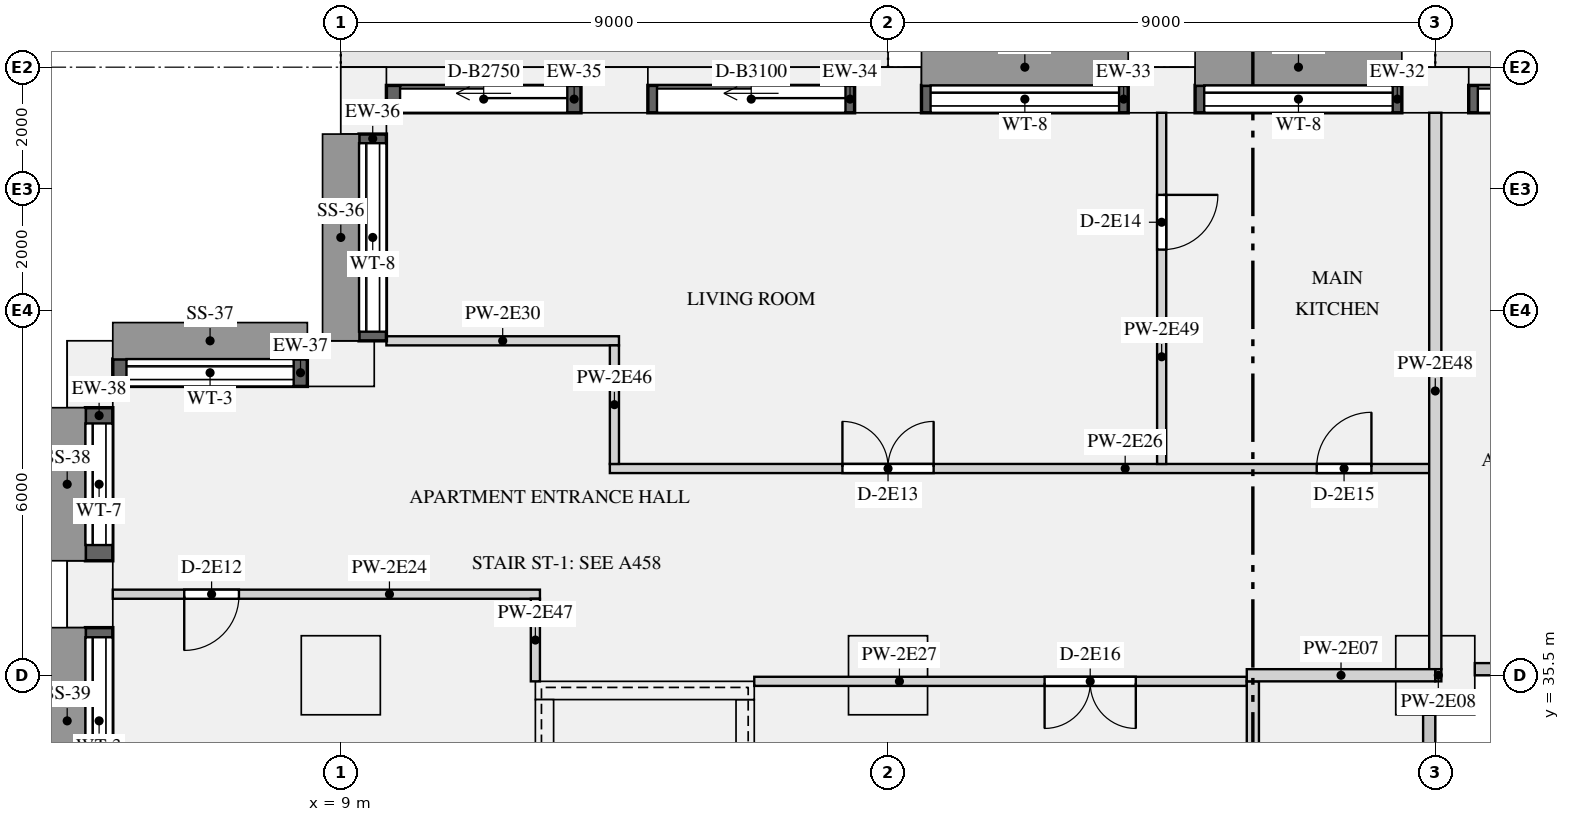
"""IFC4 building model, lengths in metres.
Left out: names, types, materials, properties, quantities, classifications, styles, units other than length and angle.
Written with IfcOpenShell. Run it as: python <this file> out.ifc"""

import sys

from ifc_helpers import new_model, si_unit, direction, frame, frame_2d, origin, origin_2d, place, context, subcontext, project, spatial, rectangle, extrude, element, fill, save


model = new_model("IFC4")
c1 = context("Model", 3, precision=1e-05, world=origin(), true_north=direction((0.0, 1.0)))
c2 = subcontext(c1, "Body", "Model", "MODEL_VIEW")
j1 = project(units=[si_unit("LENGTHUNIT", "METRE"), si_unit("PLANEANGLEUNIT", "RADIAN")], contexts=[c1])
p1 = place(None, origin())
s1 = spatial("IfcSite", under=j1, at=p1, CompositionType="ELEMENT")
p2 = place(p1, origin())
s2 = spatial("IfcBuilding", under=s1, at=p2, CompositionType="ELEMENT")
p3 = place(p2, frame((0.0, 0.0, 118.2)))
s3 = spatial("IfcBuildingStorey", under=s2, at=p3, CompositionType="ELEMENT", Elevation=118.2)
for number, where, z_axis, x_axis in (
    (1, (27.0, 45.125, 0.0), (0.0, 0.0, 1.0), (-1.0, 0.0, 0.0)),
    (2, (22.5, 45.125, 0.0), (0.0, 0.0, 1.0), (-1.0, 0.0, 0.0)),
    (3, (18.0, 45.125, 0.0), (0.0, 0.0, 1.0), (-1.0, 0.0, 0.0)),
    (4, (13.5, 45.125, 0.0), (0.0, 0.0, 1.0), (-1.0, 0.0, 0.0)),
    (5, (9.375, 44.95, 0.0), (0.0, 0.0, 1.0), (0.0, -1.0, 0.0)),
    (6, (9.0, 40.625, 0.0), (0.0, 0.0, 1.0), (-1.0, 0.0, 0.0)),
    (7, (4.875, 40.45, 0.0), (0.0, 0.0, 1.0), (0.0, -1.0, 0.0)),
    (8, (4.875, 36.833, 0.0), (0.0, 0.0, 1.0), (0.0, -1.0, 0.0)),
):
    element("IfcColumn", number, at=place(p3, frame(where, z_axis=z_axis, x_axis=x_axis)), inside=s3, PredefinedType="USERDEFINED", context=c2, shape_type="SweptSolid", body=[
        extrude(rectangle(XDim=1.1, YDim=0.75, at=origin_2d()), origin(), (0.0, 0.0, 1.0), 3.15),
    ])
for number, where, z_axis, x_axis in (
    (9, (9.0, 35.5, 0.0), (0.0, 0.0, 1.0), (1.0, 0.0, 0.0)),
    (10, (18.0, 35.5, 0.0), (0.0, 0.0, 1.0), (1.0, 0.0, 0.0)),
    (11, (27.0, 35.5, 0.0), (0.0, 0.0, 1.0), (1.0, 0.0, 0.0)),
):
    element("IfcColumn", number, at=place(p3, frame(where, z_axis=z_axis, x_axis=x_axis)), inside=s3, PredefinedType="COLUMN", context=c2, shape_type="SweptSolid", body=[
        extrude(rectangle(XDim=1.3, YDim=1.3, at=origin_2d()), origin(), (0.0, 0.0, 1.0), 3.15),
    ])
p4 = place(p3, frame((12.2, 35.25, 0.0), z_axis=(0.0, 0.0, 1.0), x_axis=(1.0, 0.0, 0.0)))
e12 = element("IfcWall", 12, at=p4, inside=s3, PredefinedType="SHEAR", context=c2, shape_type="SweptSolid", body=[
    extrude(rectangle(XDim=3.6, YDim=0.3, at=frame_2d((1.8, 0.0))), origin(), (0.0, 0.0, 1.0), 3.15),
])
for number, where, z_axis, x_axis in (
    (13, (12.35, 27.3, 0.0), (0.0, 0.0, 1.0), (0.0, 1.0, 0.0)),
    (14, (15.65, 27.3, 0.0), (0.0, 0.0, 1.0), (0.0, 1.0, 0.0)),
):
    element("IfcWall", number, at=place(p3, frame(where, z_axis=z_axis, x_axis=x_axis)), inside=s3, PredefinedType="SHEAR", context=c2, shape_type="SweptSolid", body=[
        extrude(rectangle(XDim=7.8, YDim=0.3, at=frame_2d((3.9, 0.0))), origin(), (0.0, 0.0, 1.0), 3.15),
    ])
p5 = place(p3, frame((30.95, 44.975, 0.0), z_axis=(0.0, 0.0, 1.0), x_axis=(-1.0, 0.0, 0.0)))
e15 = element("IfcWall", 15, at=p5, inside=s3, PredefinedType="SOLIDWALL", context=c2, shape_type="SweptSolid", body=[
    extrude(rectangle(XDim=3.4, YDim=0.45, at=frame_2d((1.7, 0.0))), origin(), (0.0, 0.0, 1.0), 2.83),
])
p6 = place(p5, frame((0.15, 0.0, 0.0)))
e16 = element("IfcOpeningElement", 16, at=p6, cuts=e15, PredefinedType="OPENING", context=c2, shape_type="SweptSolid", body=[
    extrude(rectangle(XDim=3.1, YDim=2.3, at=frame_2d((1.55, 1.15))), frame((0.0, 0.235, 0.0), z_axis=(0.0, -1.0, 0.0), x_axis=(1.0, 0.0, 0.0)), (0.0, 0.0, 1.0), 0.47),
])
p7 = place(p3, frame((26.45, 44.975, 0.9), z_axis=(0.0, 0.0, 1.0), x_axis=(-1.0, 0.0, 0.0)))
e17 = element("IfcWall", 17, at=p7, inside=s3, PredefinedType="SOLIDWALL", context=c2, shape_type="SweptSolid", body=[
    extrude(rectangle(XDim=3.4, YDim=0.45, at=frame_2d((1.7, 0.0))), origin(), (0.0, 0.0, 1.0), 1.93),
])
p8 = place(p7, frame((0.15, 0.0, 0.15)))
e18 = element("IfcOpeningElement", 18, at=p8, cuts=e17, PredefinedType="OPENING", context=c2, shape_type="SweptSolid", body=[
    extrude(rectangle(XDim=3.1, YDim=1.5, at=frame_2d((1.55, 0.75))), frame((0.0, 0.235, 0.0), z_axis=(0.0, -1.0, 0.0), x_axis=(1.0, 0.0, 0.0)), (0.0, 0.0, 1.0), 0.47),
])
p9 = place(p3, frame((21.95, 44.975, 0.9), z_axis=(0.0, 0.0, 1.0), x_axis=(-1.0, 0.0, 0.0)))
e19 = element("IfcWall", 19, at=p9, inside=s3, PredefinedType="SOLIDWALL", context=c2, shape_type="SweptSolid", body=[
    extrude(rectangle(XDim=3.4, YDim=0.45, at=frame_2d((1.7, 0.0))), origin(), (0.0, 0.0, 1.0), 1.93),
])
p10 = place(p9, frame((0.15, 0.0, 0.15)))
e20 = element("IfcOpeningElement", 20, at=p10, cuts=e19, PredefinedType="OPENING", context=c2, shape_type="SweptSolid", body=[
    extrude(rectangle(XDim=3.1, YDim=1.5, at=frame_2d((1.55, 0.75))), frame((0.0, 0.235, 0.0), z_axis=(0.0, -1.0, 0.0), x_axis=(1.0, 0.0, 0.0)), (0.0, 0.0, 1.0), 0.47),
])
p11 = place(p3, frame((17.45, 44.975, 0.0), z_axis=(0.0, 0.0, 1.0), x_axis=(-1.0, 0.0, 0.0)))
e21 = element("IfcWall", 21, at=p11, inside=s3, PredefinedType="SOLIDWALL", context=c2, shape_type="SweptSolid", body=[
    extrude(rectangle(XDim=3.4, YDim=0.45, at=frame_2d((1.7, 0.0))), origin(), (0.0, 0.0, 1.0), 2.83),
])
p12 = place(p11, frame((0.15, 0.0, 0.0)))
e22 = element("IfcOpeningElement", 22, at=p12, cuts=e21, PredefinedType="OPENING", context=c2, shape_type="SweptSolid", body=[
    extrude(rectangle(XDim=3.1, YDim=2.3, at=frame_2d((1.55, 1.15))), frame((0.0, 0.235, 0.0), z_axis=(0.0, -1.0, 0.0), x_axis=(1.0, 0.0, 0.0)), (0.0, 0.0, 1.0), 0.47),
])
p13 = place(p3, frame((12.95, 44.975, 0.0), z_axis=(0.0, 0.0, 1.0), x_axis=(-1.0, 0.0, 0.0)))
e23 = element("IfcWall", 23, at=p13, inside=s3, PredefinedType="SOLIDWALL", context=c2, shape_type="SweptSolid", body=[
    extrude(rectangle(XDim=3.2, YDim=0.45, at=frame_2d((1.6, 0.0))), origin(), (0.0, 0.0, 1.0), 2.83),
])
p14 = place(p13, frame((0.225, 0.0, 0.0)))
e24 = element("IfcOpeningElement", 24, at=p14, cuts=e23, PredefinedType="OPENING", context=c2, shape_type="SweptSolid", body=[
    extrude(rectangle(XDim=2.75, YDim=2.3, at=frame_2d((1.375, 1.15))), frame((0.0, 0.235, 0.0), z_axis=(0.0, -1.0, 0.0), x_axis=(1.0, 0.0, 0.0)), (0.0, 0.0, 1.0), 0.47),
])
p15 = place(p3, frame((9.525, 44.4, 0.9), z_axis=(0.0, 0.0, 1.0), x_axis=(0.0, -1.0, 0.0)))
e25 = element("IfcWall", 25, at=p15, inside=s3, PredefinedType="SOLIDWALL", context=c2, shape_type="SweptSolid", body=[
    extrude(rectangle(XDim=3.4, YDim=0.45, at=frame_2d((1.7, 0.0))), origin(), (0.0, 0.0, 1.0), 1.93),
])
p16 = place(p15, frame((0.15, 0.0, 0.15)))
e26 = element("IfcOpeningElement", 26, at=p16, cuts=e25, PredefinedType="OPENING", context=c2, shape_type="SweptSolid", body=[
    extrude(rectangle(XDim=3.1, YDim=1.5, at=frame_2d((1.55, 0.75))), frame((0.0, 0.235, 0.0), z_axis=(0.0, -1.0, 0.0), x_axis=(1.0, 0.0, 0.0)), (0.0, 0.0, 1.0), 0.47),
])
p17 = place(p3, frame((8.45, 40.475, 0.9), z_axis=(0.0, 0.0, 1.0), x_axis=(-1.0, 0.0, 0.0)))
e27 = element("IfcWall", 27, at=p17, inside=s3, PredefinedType="SOLIDWALL", context=c2, shape_type="SweptSolid", body=[
    extrude(rectangle(XDim=3.2, YDim=0.45, at=frame_2d((1.6, 0.0))), origin(), (0.0, 0.0, 1.0), 1.93),
])
p18 = place(p17, frame((0.225, 0.0, 0.15)))
e28 = element("IfcOpeningElement", 28, at=p18, cuts=e27, PredefinedType="OPENING", context=c2, shape_type="SweptSolid", body=[
    extrude(rectangle(XDim=2.75, YDim=1.5, at=frame_2d((1.375, 0.75))), frame((0.0, 0.235, 0.0), z_axis=(0.0, -1.0, 0.0), x_axis=(1.0, 0.0, 0.0)), (0.0, 0.0, 1.0), 0.47),
])
p19 = place(p3, frame((5.025, 39.9, 0.9), z_axis=(0.0, 0.0, 1.0), x_axis=(0.0, -1.0, 0.0)))
e29 = element("IfcWall", 29, at=p19, inside=s3, PredefinedType="SOLIDWALL", context=c2, shape_type="SweptSolid", body=[
    extrude(rectangle(XDim=2.517, YDim=0.45, at=frame_2d((1.258, 0.0))), origin(), (0.0, 0.0, 1.0), 1.93),
])
p20 = place(p19, frame((0.259, 0.0, 0.15)))
e30 = element("IfcOpeningElement", 30, at=p20, cuts=e29, PredefinedType="OPENING", context=c2, shape_type="SweptSolid", body=[
    extrude(rectangle(XDim=2.0, YDim=1.5, at=frame_2d((1.0, 0.75))), frame((0.0, 0.235, 0.0), z_axis=(0.0, -1.0, 0.0), x_axis=(1.0, 0.0, 0.0)), (0.0, 0.0, 1.0), 0.47),
])
p21 = place(p3, frame((5.025, 36.283, 0.9), z_axis=(0.0, 0.0, 1.0), x_axis=(0.0, -1.0, 0.0)))
e31 = element("IfcWall", 31, at=p21, inside=s3, PredefinedType="SOLIDWALL", context=c2, shape_type="SweptSolid", body=[
    extrude(rectangle(XDim=3.066, YDim=0.45, at=frame_2d((1.533, 0.0))), origin(), (0.0, 0.0, 1.0), 1.93),
])
p22 = place(p21, frame((0.158, 0.0, 0.15)))
e32 = element("IfcOpeningElement", 32, at=p22, cuts=e31, PredefinedType="OPENING", context=c2, shape_type="SweptSolid", body=[
    extrude(rectangle(XDim=2.75, YDim=1.5, at=frame_2d((1.375, 0.75))), frame((0.0, 0.235, 0.0), z_axis=(0.0, -1.0, 0.0), x_axis=(1.0, 0.0, 0.0)), (0.0, 0.0, 1.0), 0.47),
])
p23 = place(p3, frame((23.9, 35.5, 0.0), z_axis=(0.0, 0.0, 1.0), x_axis=(1.0, 0.0, 0.0)))
e33 = element("IfcWall", 33, at=p23, inside=s3, PredefinedType="PARTITIONING", context=c2, shape_type="SweptSolid", body=[
    extrude(rectangle(XDim=3.1, YDim=0.2, at=frame_2d((1.55, 0.0))), origin(), (0.0, 0.0, 1.0), 2.83),
])
p24 = place(p3, frame((27.0, 35.5, 0.0), z_axis=(0.0, 0.0, 1.0), x_axis=(1.0, 0.0, 0.0)))
e34 = element("IfcWall", 34, at=p24, inside=s3, PredefinedType="PARTITIONING", context=c2, shape_type="SweptSolid", body=[
    extrude(rectangle(XDim=0.1, YDim=0.2, at=frame_2d((0.05, 0.0))), origin(), (0.0, 0.0, 1.0), 2.83),
])
p25 = place(p3, frame((5.25, 36.833, 0.0), z_axis=(0.0, 0.0, 1.0), x_axis=(1.0, 0.0, 0.0)))
e35 = element("IfcWall", 35, at=p25, inside=s3, PredefinedType="PARTITIONING", context=c2, shape_type="SweptSolid", body=[
    extrude(rectangle(XDim=7.025, YDim=0.15, at=frame_2d((3.512, 0.0))), origin(), (0.0, 0.0, 1.0), 2.83),
])
p26 = place(p25, frame((1.175, 0.0, 0.0)))
e36 = element("IfcOpeningElement", 36, at=p26, cuts=e35, PredefinedType="OPENING", context=c2, shape_type="SweptSolid", body=[
    extrude(rectangle(XDim=0.9, YDim=2.1, at=frame_2d((0.45, 1.05))), frame((0.0, 0.085, 0.0), z_axis=(0.0, -1.0, 0.0), x_axis=(1.0, 0.0, 0.0)), (0.0, 0.0, 1.0), 0.17),
])
p27 = place(p3, frame((13.425, 38.9, 0.0), z_axis=(0.0, 0.0, 1.0), x_axis=(1.0, 0.0, 0.0)))
e37 = element("IfcWall", 37, at=p27, inside=s3, PredefinedType="PARTITIONING", context=c2, shape_type="SweptSolid", body=[
    extrude(rectangle(XDim=13.475, YDim=0.15, at=frame_2d((6.737, 0.0))), origin(), (0.0, 0.0, 1.0), 2.83),
])
p28 = place(p27, frame((3.825, 0.0, 0.0)))
e38 = element("IfcOpeningElement", 38, at=p28, cuts=e37, PredefinedType="OPENING", context=c2, shape_type="SweptSolid", body=[
    extrude(rectangle(XDim=1.5, YDim=2.1, at=frame_2d((0.75, 1.05))), frame((0.0, 0.085, 0.0), z_axis=(0.0, -1.0, 0.0), x_axis=(1.0, 0.0, 0.0)), (0.0, 0.0, 1.0), 0.17),
])
p29 = place(p27, frame((11.625, 0.0, 0.0)))
e39 = element("IfcOpeningElement", 39, at=p29, cuts=e37, PredefinedType="OPENING", context=c2, shape_type="SweptSolid", body=[
    extrude(rectangle(XDim=0.9, YDim=2.1, at=frame_2d((0.45, 1.05))), frame((0.0, 0.085, 0.0), z_axis=(0.0, -1.0, 0.0), x_axis=(1.0, 0.0, 0.0)), (0.0, 0.0, 1.0), 0.17),
])
p30 = place(p3, frame((15.8, 35.4, 0.0), z_axis=(0.0, 0.0, 1.0), x_axis=(1.0, 0.0, 0.0)))
e40 = element("IfcWall", 40, at=p30, inside=s3, PredefinedType="PARTITIONING", context=c2, shape_type="SweptSolid", body=[
    extrude(rectangle(XDim=8.1, YDim=0.15, at=frame_2d((4.05, 0.0))), origin(), (0.0, 0.0, 1.0), 2.83),
])
p31 = place(p30, frame((4.775, 0.0, 0.0)))
e41 = element("IfcOpeningElement", 41, at=p31, cuts=e40, PredefinedType="OPENING", context=c2, shape_type="SweptSolid", body=[
    extrude(rectangle(XDim=1.5, YDim=2.1, at=frame_2d((0.75, 1.05))), frame((0.0, 0.085, 0.0), z_axis=(0.0, -1.0, 0.0), x_axis=(1.0, 0.0, 0.0)), (0.0, 0.0, 1.0), 0.17),
])
p32 = place(p3, frame((9.75, 41.0, 0.0), z_axis=(0.0, 0.0, 1.0), x_axis=(1.0, 0.0, 0.0)))
e42 = element("IfcWall", 42, at=p32, inside=s3, PredefinedType="PARTITIONING", context=c2, shape_type="SweptSolid", body=[
    extrude(rectangle(XDim=3.825, YDim=0.15, at=frame_2d((1.913, 0.0))), origin(), (0.0, 0.0, 1.0), 2.83),
])
p33 = place(p3, frame((24.0, 27.1, 0.0), z_axis=(0.0, 0.0, 1.0), x_axis=(0.0, 1.0, 0.0)))
e43 = element("IfcWall", 43, at=p33, inside=s3, PredefinedType="PARTITIONING", context=c2, shape_type="SweptSolid", body=[
    extrude(rectangle(XDim=8.3, YDim=0.2, at=frame_2d((4.15, 0.0))), origin(), (0.0, 0.0, 1.0), 2.83),
])
p34 = place(p3, frame((13.5, 38.975, 0.0), z_axis=(0.0, 0.0, 1.0), x_axis=(0.0, 1.0, 0.0)))
e44 = element("IfcWall", 44, at=p34, inside=s3, PredefinedType="PARTITIONING", context=c2, shape_type="SweptSolid", body=[
    extrude(rectangle(XDim=1.95, YDim=0.15, at=frame_2d((0.975, 0.0))), origin(), (0.0, 0.0, 1.0), 2.83),
])
p35 = place(p3, frame((12.2, 35.4, 0.0), z_axis=(0.0, 0.0, 1.0), x_axis=(0.0, 1.0, 0.0)))
e45 = element("IfcWall", 45, at=p35, inside=s3, PredefinedType="PARTITIONING", context=c2, shape_type="SweptSolid", body=[
    extrude(rectangle(XDim=1.358, YDim=0.15, at=frame_2d((0.679, 0.0))), origin(), (0.0, 0.0, 1.0), 2.83),
])
p36 = place(p3, frame((27.0, 35.6, 0.0), z_axis=(0.0, 0.0, 1.0), x_axis=(0.0, 1.0, 0.0)))
e46 = element("IfcWall", 46, at=p36, inside=s3, PredefinedType="PARTITIONING", context=c2, shape_type="SweptSolid", body=[
    extrude(rectangle(XDim=9.15, YDim=0.2, at=frame_2d((4.575, 0.0))), origin(), (0.0, 0.0, 1.0), 2.83),
])
p37 = place(p3, frame((22.5, 38.975, 0.0), z_axis=(0.0, 0.0, 1.0), x_axis=(0.0, 1.0, 0.0)))
e47 = element("IfcWall", 47, at=p37, inside=s3, PredefinedType="PARTITIONING", context=c2, shape_type="SweptSolid", body=[
    extrude(rectangle(XDim=5.775, YDim=0.15, at=frame_2d((2.887, 0.0))), origin(), (0.0, 0.0, 1.0), 2.83),
])
p38 = place(p37, frame((3.525, 0.0, 0.0)))
e48 = element("IfcOpeningElement", 48, at=p38, cuts=e47, PredefinedType="OPENING", context=c2, shape_type="SweptSolid", body=[
    extrude(rectangle(XDim=0.9, YDim=2.1, at=frame_2d((0.45, 1.05))), frame((0.0, 0.085, 0.0), z_axis=(0.0, -1.0, 0.0), x_axis=(1.0, 0.0, 0.0)), (0.0, 0.0, 1.0), 0.17),
])
p39 = place(p6, origin())
e49 = element("IfcDoor", 49, at=p39, inside=s3, OperationType="SLIDING_TO_LEFT", PredefinedType="DOOR", context=c2, shape_type="SweptSolid", body=[
    extrude(rectangle(XDim=3.1, YDim=2.3, at=frame_2d((1.55, 1.15))), frame((0.0, -0.07, 0.0), z_axis=(0.0, -1.0, 0.0), x_axis=(1.0, 0.0, 0.0)), (0.0, 0.0, 1.0), 0.05),
])
fill(e16, e49)
p40 = place(p8, origin())
e50 = element("IfcWindow", 50, at=p40, inside=s3, PartitioningType="SINGLE_PANEL", PredefinedType="WINDOW", context=c2, shape_type="SweptSolid", body=[
    extrude(rectangle(XDim=3.1, YDim=1.5, at=frame_2d((1.55, 0.75))), frame((0.0, -0.065, 0.0), z_axis=(0.0, -1.0, 0.0), x_axis=(1.0, 0.0, 0.0)), (0.0, 0.0, 1.0), 0.06),
])
fill(e18, e50)
p41 = place(p10, origin())
e51 = element("IfcWindow", 51, at=p41, inside=s3, PartitioningType="SINGLE_PANEL", PredefinedType="WINDOW", context=c2, shape_type="SweptSolid", body=[
    extrude(rectangle(XDim=3.1, YDim=1.5, at=frame_2d((1.55, 0.75))), frame((0.0, -0.065, 0.0), z_axis=(0.0, -1.0, 0.0), x_axis=(1.0, 0.0, 0.0)), (0.0, 0.0, 1.0), 0.06),
])
fill(e20, e51)
p42 = place(p12, origin())
e52 = element("IfcDoor", 52, at=p42, inside=s3, OperationType="SLIDING_TO_LEFT", PredefinedType="DOOR", context=c2, shape_type="SweptSolid", body=[
    extrude(rectangle(XDim=3.1, YDim=2.3, at=frame_2d((1.55, 1.15))), frame((0.0, -0.07, 0.0), z_axis=(0.0, -1.0, 0.0), x_axis=(1.0, 0.0, 0.0)), (0.0, 0.0, 1.0), 0.05),
])
fill(e22, e52)
p43 = place(p14, origin())
e53 = element("IfcDoor", 53, at=p43, inside=s3, OperationType="SLIDING_TO_LEFT", PredefinedType="DOOR", context=c2, shape_type="SweptSolid", body=[
    extrude(rectangle(XDim=2.75, YDim=2.3, at=frame_2d((1.375, 1.15))), frame((0.0, -0.07, 0.0), z_axis=(0.0, -1.0, 0.0), x_axis=(1.0, 0.0, 0.0)), (0.0, 0.0, 1.0), 0.05),
])
fill(e24, e53)
p44 = place(p16, origin())
e54 = element("IfcWindow", 54, at=p44, inside=s3, PartitioningType="SINGLE_PANEL", PredefinedType="WINDOW", context=c2, shape_type="SweptSolid", body=[
    extrude(rectangle(XDim=3.1, YDim=1.5, at=frame_2d((1.55, 0.75))), frame((0.0, -0.065, 0.0), z_axis=(0.0, -1.0, 0.0), x_axis=(1.0, 0.0, 0.0)), (0.0, 0.0, 1.0), 0.06),
])
fill(e26, e54)
p45 = place(p18, origin())
e55 = element("IfcWindow", 55, at=p45, inside=s3, PartitioningType="SINGLE_PANEL", PredefinedType="WINDOW", context=c2, shape_type="SweptSolid", body=[
    extrude(rectangle(XDim=2.75, YDim=1.5, at=frame_2d((1.375, 0.75))), frame((0.0, -0.065, 0.0), z_axis=(0.0, -1.0, 0.0), x_axis=(1.0, 0.0, 0.0)), (0.0, 0.0, 1.0), 0.06),
])
fill(e28, e55)
p46 = place(p20, origin())
e56 = element("IfcWindow", 56, at=p46, inside=s3, PartitioningType="SINGLE_PANEL", PredefinedType="WINDOW", context=c2, shape_type="SweptSolid", body=[
    extrude(rectangle(XDim=2.0, YDim=1.5, at=frame_2d((1.0, 0.75))), frame((0.0, -0.065, 0.0), z_axis=(0.0, -1.0, 0.0), x_axis=(1.0, 0.0, 0.0)), (0.0, 0.0, 1.0), 0.06),
])
fill(e30, e56)
p47 = place(p22, origin())
e57 = element("IfcWindow", 57, at=p47, inside=s3, PartitioningType="SINGLE_PANEL", PredefinedType="WINDOW", context=c2, shape_type="SweptSolid", body=[
    extrude(rectangle(XDim=2.75, YDim=1.5, at=frame_2d((1.375, 0.75))), frame((0.0, -0.065, 0.0), z_axis=(0.0, -1.0, 0.0), x_axis=(1.0, 0.0, 0.0)), (0.0, 0.0, 1.0), 0.06),
])
fill(e32, e57)
p48 = place(p26, frame((0.9, 0.0, 0.0), z_axis=(0.0, 0.0, 1.0), x_axis=(-1.0, 0.0, 0.0)))
e58 = element("IfcDoor", 58, at=p48, inside=s3, OperationType="SINGLE_SWING_RIGHT", PredefinedType="DOOR", context=c2, shape_type="SweptSolid", body=[
    extrude(rectangle(XDim=0.9, YDim=2.1, at=frame_2d((0.45, 1.05))), frame((0.0, 0.025, 0.0), z_axis=(0.0, -1.0, 0.0), x_axis=(1.0, 0.0, 0.0)), (0.0, 0.0, 1.0), 0.05),
])
fill(e36, e58)
p49 = place(p28, origin())
e59 = element("IfcDoor", 59, at=p49, inside=s3, OperationType="DOUBLE_DOOR_SINGLE_SWING", PredefinedType="DOOR", context=c2, shape_type="SweptSolid", body=[
    extrude(rectangle(XDim=1.5, YDim=2.1, at=frame_2d((0.75, 1.05))), frame((0.0, 0.025, 0.0), z_axis=(0.0, -1.0, 0.0), x_axis=(1.0, 0.0, 0.0)), (0.0, 0.0, 1.0), 0.05),
])
fill(e38, e59)
p50 = place(p38, frame((0.9, 0.0, 0.0), z_axis=(0.0, 0.0, 1.0), x_axis=(-1.0, 0.0, 0.0)))
e60 = element("IfcDoor", 60, at=p50, inside=s3, OperationType="SINGLE_SWING_LEFT", PredefinedType="DOOR", context=c2, shape_type="SweptSolid", body=[
    extrude(rectangle(XDim=0.9, YDim=2.1, at=frame_2d((0.45, 1.05))), frame((0.0, 0.025, 0.0), z_axis=(0.0, -1.0, 0.0), x_axis=(1.0, 0.0, 0.0)), (0.0, 0.0, 1.0), 0.05),
])
fill(e48, e60)
p51 = place(p29, origin())
e61 = element("IfcDoor", 61, at=p51, inside=s3, OperationType="SINGLE_SWING_RIGHT", PredefinedType="DOOR", context=c2, shape_type="SweptSolid", body=[
    extrude(rectangle(XDim=0.9, YDim=2.1, at=frame_2d((0.45, 1.05))), frame((0.0, 0.025, 0.0), z_axis=(0.0, -1.0, 0.0), x_axis=(1.0, 0.0, 0.0)), (0.0, 0.0, 1.0), 0.05),
])
fill(e39, e61)
p52 = place(p31, frame((1.5, 0.0, 0.0), z_axis=(0.0, 0.0, 1.0), x_axis=(-1.0, 0.0, 0.0)))
e62 = element("IfcDoor", 62, at=p52, inside=s3, OperationType="DOUBLE_DOOR_SINGLE_SWING", PredefinedType="DOOR", context=c2, shape_type="SweptSolid", body=[
    extrude(rectangle(XDim=1.5, YDim=2.1, at=frame_2d((0.75, 1.05))), frame((0.0, 0.025, 0.0), z_axis=(0.0, -1.0, 0.0), x_axis=(1.0, 0.0, 0.0)), (0.0, 0.0, 1.0), 0.05),
])
fill(e41, e62)
save(model, sys.argv[1])
